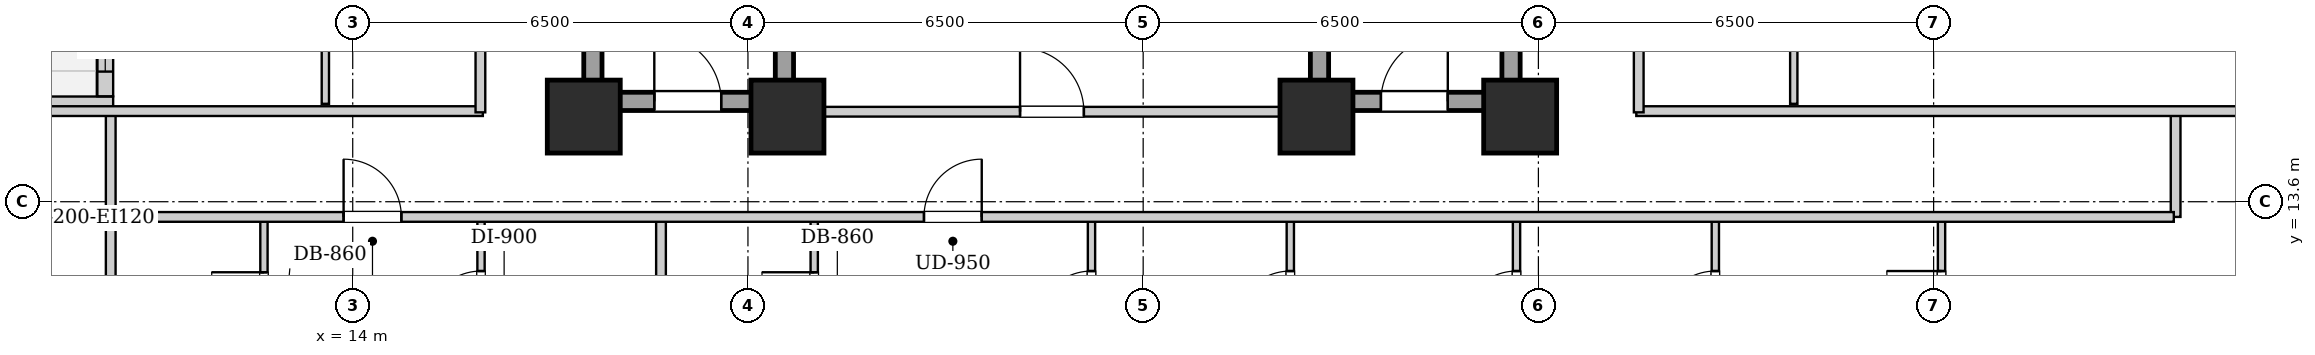
"""IFC4 building model, lengths in metres.
Left out: names, types, materials, properties, quantities, classifications, styles, units other than length and angle.
Written with IfcOpenShell. Run it as: python <this file> out.ifc"""

import sys

from ifc_helpers import new_model, si_unit, direction, frame, frame_2d, origin, origin_2d, place, context, subcontext, project, spatial, rectangle, extrude, element, fill, save


model = new_model("IFC4")
c1 = context("Model", 3, precision=1e-05, world=origin(), true_north=direction((0.0, 1.0)))
c2 = subcontext(c1, "Body", "Model", "MODEL_VIEW")
j1 = project(units=[si_unit("LENGTHUNIT", "METRE"), si_unit("PLANEANGLEUNIT", "RADIAN")], contexts=[c1])
p1 = place(None, origin())
s1 = spatial("IfcSite", under=j1, at=p1, CompositionType="ELEMENT")
p2 = place(p1, origin())
s2 = spatial("IfcBuilding", under=s1, at=p2, CompositionType="ELEMENT")
p3 = place(p2, frame((0.0, 0.0, 38.6)))
s3 = spatial("IfcBuildingStorey", under=s2, at=p3, CompositionType="ELEMENT", Elevation=38.6)
for number, where, z_axis, x_axis in (
    (1, (17.8, 15.0, 0.0), (0.0, 0.0, 1.0), (1.0, 0.0, 0.0)),
    (2, (21.15, 15.0, 0.0), (0.0, 0.0, 1.0), (1.0, 0.0, 0.0)),
    (3, (29.85, 15.0, 0.0), (0.0, 0.0, 1.0), (1.0, 0.0, 0.0)),
    (4, (33.2, 15.0, 0.0), (0.0, 0.0, 1.0), (1.0, 0.0, 0.0)),
):
    element("IfcColumn", number, at=place(p3, frame(where, z_axis=z_axis, x_axis=x_axis)), inside=s3, PredefinedType="COLUMN", context=c2, shape_type="SweptSolid", body=[
        extrude(rectangle(XDim=1.2, YDim=1.2, at=origin_2d()), origin(), (0.0, 0.0, 1.0), 3.2),
    ])
p4 = place(p3, frame((7.66, 15.2, 0.0), z_axis=(0.0, 0.0, 1.0), x_axis=(1.0, 0.0, 0.0)))
e5 = element("IfcWall", 5, at=p4, inside=s3, PredefinedType="SOLIDWALL", context=c2, shape_type="SweptSolid", body=[
    extrude(rectangle(XDim=2.4, YDim=0.26, at=frame_2d((1.2, 0.0))), origin(), (0.0, 0.0, 1.0), 2.94),
])
p5 = place(p3, frame((9.93, 15.334, 0.0), z_axis=(0.0, 0.0, 1.0), x_axis=(0.0, 1.0, 0.0)))
e6 = element("IfcWall", 6, at=p5, inside=s3, PredefinedType="SOLIDWALL", context=c2, shape_type="SweptSolid", body=[
    extrude(rectangle(XDim=3.932, YDim=0.26, at=frame_2d((1.966, 0.0))), origin(), (0.0, 0.0, 1.0), 2.94),
])
p6 = place(p5, frame((1.416, 0.0, 0.0)))
e7 = element("IfcOpeningElement", 7, at=p6, cuts=e6, PredefinedType="OPENING", context=c2, shape_type="SweptSolid", body=[
    extrude(rectangle(XDim=1.1, YDim=2.0, at=frame_2d((0.55, 1.0))), frame((0.0, 0.14, 0.0), z_axis=(0.0, -1.0, 0.0), x_axis=(1.0, 0.0, 0.0)), (0.0, 0.0, 1.0), 0.28),
])
p7 = place(p5, frame((0.406, 0.0, 0.55)))
e8 = element("IfcOpeningElement", 8, at=p7, cuts=e6, PredefinedType="OPENING", context=c2, shape_type="SweptSolid", body=[
    extrude(rectangle(XDim=0.85, YDim=1.2, at=frame_2d((0.425, 0.6))), frame((0.0, 0.14, 0.0), z_axis=(0.0, -1.0, 0.0), x_axis=(1.0, 0.0, 0.0)), (0.0, 0.0, 1.0), 0.28),
])
for number, where, z_axis, x_axis in (
    (9, (17.95, 15.1, 0.0), (0.0, 0.0, 1.0), (0.0, 1.0, 0.0)),
    (10, (21.1, 15.1, 0.0), (0.0, 0.0, 1.0), (0.0, 1.0, 0.0)),
):
    element("IfcWall", number, at=place(p3, frame(where, z_axis=z_axis, x_axis=x_axis)), inside=s3, PredefinedType="SHEAR", context=c2, shape_type="SweptSolid", body=[
        extrude(rectangle(XDim=9.0, YDim=0.3, at=frame_2d((4.5, 0.0))), origin(), (0.0, 0.0, 1.0), 2.94),
    ])
p8 = place(p3, frame((18.1, 15.25, 0.0), z_axis=(0.0, 0.0, 1.0), x_axis=(1.0, 0.0, 0.0)))
e11 = element("IfcWall", 11, at=p8, inside=s3, PredefinedType="SHEAR", context=c2, shape_type="SweptSolid", body=[
    extrude(rectangle(XDim=2.85, YDim=0.3, at=frame_2d((1.425, 0.0))), origin(), (0.0, 0.0, 1.0), 2.94),
])
p9 = place(p8, frame((0.86, 0.0, 0.0)))
e12 = element("IfcOpeningElement", 12, at=p9, cuts=e11, PredefinedType="OPENING", context=c2, shape_type="SweptSolid", body=[
    extrude(rectangle(XDim=1.1, YDim=2.05, at=frame_2d((0.55, 1.025))), frame((0.0, 0.16, 0.0), z_axis=(0.0, -1.0, 0.0), x_axis=(1.0, 0.0, 0.0)), (0.0, 0.0, 1.0), 0.32),
])
for number, where, z_axis, x_axis in (
    (13, (29.9, 15.1, 0.0), (0.0, 0.0, 1.0), (0.0, 1.0, 0.0)),
    (14, (33.05, 15.1, 0.0), (0.0, 0.0, 1.0), (0.0, 1.0, 0.0)),
):
    element("IfcWall", number, at=place(p3, frame(where, z_axis=z_axis, x_axis=x_axis)), inside=s3, PredefinedType="SHEAR", context=c2, shape_type="SweptSolid", body=[
        extrude(rectangle(XDim=9.0, YDim=0.3, at=frame_2d((4.5, 0.0))), origin(), (0.0, 0.0, 1.0), 2.94),
    ])
p10 = place(p3, frame((30.05, 15.25, 0.0), z_axis=(0.0, 0.0, 1.0), x_axis=(1.0, 0.0, 0.0)))
e15 = element("IfcWall", 15, at=p10, inside=s3, PredefinedType="SHEAR", context=c2, shape_type="SweptSolid", body=[
    extrude(rectangle(XDim=2.85, YDim=0.3, at=frame_2d((1.425, 0.0))), origin(), (0.0, 0.0, 1.0), 2.94),
])
p11 = place(p10, frame((0.86, 0.0, 0.0)))
e16 = element("IfcOpeningElement", 16, at=p11, cuts=e15, PredefinedType="OPENING", context=c2, shape_type="SweptSolid", body=[
    extrude(rectangle(XDim=1.1, YDim=2.05, at=frame_2d((0.55, 1.025))), frame((0.0, 0.16, 0.0), z_axis=(0.0, -1.0, 0.0), x_axis=(1.0, 0.0, 0.0)), (0.0, 0.0, 1.0), 0.32),
])
p12 = place(p3, frame((21.25, 15.08, 0.0), z_axis=(0.0, 0.0, 1.0), x_axis=(1.0, 0.0, 0.0)))
e17 = element("IfcWall", 17, at=p12, inside=s3, PredefinedType="PARTITIONING", context=c2, shape_type="SweptSolid", body=[
    extrude(rectangle(XDim=8.5, YDim=0.16, at=frame_2d((4.25, 0.0))), origin(), (0.0, 0.0, 1.0), 2.155),
])
p13 = place(p12, frame((3.725, 0.0, 0.0)))
e18 = element("IfcOpeningElement", 18, at=p13, cuts=e17, PredefinedType="OPENING", context=c2, shape_type="SweptSolid", body=[
    extrude(rectangle(XDim=1.05, YDim=2.05, at=frame_2d((0.525, 1.025))), frame((0.0, 0.09, 0.0), z_axis=(0.0, -1.0, 0.0), x_axis=(1.0, 0.0, 0.0)), (0.0, 0.0, 1.0), 0.18),
])
for number, where, z_axis, x_axis in (
    (19, (10.02, 13.35, 0.0), (0.0, 0.0, 1.0), (0.0, 1.0, 0.0)),
    (20, (43.98, 13.35, 0.0), (0.0, 0.0, 1.0), (0.0, 1.0, 0.0)),
):
    element("IfcWall", number, at=place(p3, frame(where, z_axis=z_axis, x_axis=x_axis)), inside=s3, PredefinedType="PARTITIONING", context=c2, shape_type="SweptSolid", body=[
        extrude(rectangle(XDim=1.74, YDim=0.16, at=frame_2d((0.87, 0.0))), origin(), (0.0, 0.0, 1.0), 2.94),
    ])
p14 = place(p3, frame((7.78, 15.09, 0.0), z_axis=(0.0, 0.0, 1.0), x_axis=(1.0, 0.0, 0.0)))
e21 = element("IfcWall", 21, at=p14, inside=s3, PredefinedType="PARTITIONING", context=c2, shape_type="SweptSolid", body=[
    extrude(rectangle(XDim=8.36, YDim=0.16, at=frame_2d((4.18, 0.0))), origin(), (0.0, 0.0, 1.0), 2.155),
])
p15 = place(p3, frame((35.11, 15.09, 0.0), z_axis=(0.0, 0.0, 1.0), x_axis=(1.0, 0.0, 0.0)))
e22 = element("IfcWall", 22, at=p15, inside=s3, PredefinedType="PARTITIONING", context=c2, shape_type="SweptSolid", body=[
    extrude(rectangle(XDim=11.11, YDim=0.16, at=frame_2d((5.555, 0.0))), origin(), (0.0, 0.0, 1.0), 2.155),
])
p16 = place(p3, frame((10.02, 10.65, 0.0), z_axis=(0.0, 0.0, 1.0), x_axis=(0.0, 1.0, 0.0)))
e23 = element("IfcWall", 23, at=p16, inside=s3, PredefinedType="PARTITIONING", context=c2, shape_type="SweptSolid", body=[
    extrude(rectangle(XDim=2.66, YDim=0.16, at=frame_2d((1.33, 0.0))), origin(), (0.0, 0.0, 1.0), 2.94),
])
p17 = place(p3, frame((12.54, 10.71, 0.0), z_axis=(0.0, 0.0, 1.0), x_axis=(0.0, 1.0, 0.0)))
e24 = element("IfcWall", 24, at=p17, inside=s3, PredefinedType="PARTITIONING", context=c2, shape_type="SweptSolid", body=[
    extrude(rectangle(XDim=2.6, YDim=0.12, at=frame_2d((1.3, 0.0))), origin(), (0.0, 0.0, 1.0), 2.94),
])
p18 = place(p17, frame((0.87, 0.0, 0.0)))
e25 = element("IfcOpeningElement", 25, at=p18, cuts=e24, PredefinedType="OPENING", context=c2, shape_type="SweptSolid", body=[
    extrude(rectangle(XDim=0.86, YDim=2.05, at=frame_2d((0.43, 1.025))), frame((0.0, 0.07, 0.0), z_axis=(0.0, -1.0, 0.0), x_axis=(1.0, 0.0, 0.0)), (0.0, 0.0, 1.0), 0.14),
])
p19 = place(p3, frame((16.11, 10.71, 0.0), z_axis=(0.0, 0.0, 1.0), x_axis=(0.0, 1.0, 0.0)))
e26 = element("IfcWall", 26, at=p19, inside=s3, PredefinedType="PARTITIONING", context=c2, shape_type="SweptSolid", body=[
    extrude(rectangle(XDim=2.6, YDim=0.12, at=frame_2d((1.3, 0.0))), origin(), (0.0, 0.0, 1.0), 2.94),
])
p20 = place(p19, frame((0.85, 0.0, 0.0)))
e27 = element("IfcOpeningElement", 27, at=p20, cuts=e26, PredefinedType="OPENING", context=c2, shape_type="SweptSolid", body=[
    extrude(rectangle(XDim=0.9, YDim=2.05, at=frame_2d((0.45, 1.025))), frame((0.0, 0.07, 0.0), z_axis=(0.0, -1.0, 0.0), x_axis=(1.0, 0.0, 0.0)), (0.0, 0.0, 1.0), 0.14),
])
p21 = place(p3, frame((19.07, 0.28, 0.0), z_axis=(0.0, 0.0, 1.0), x_axis=(0.0, 1.0, 0.0)))
e28 = element("IfcWall", 28, at=p21, inside=s3, PredefinedType="PARTITIONING", context=c2, shape_type="SweptSolid", body=[
    extrude(rectangle(XDim=13.03, YDim=0.16, at=frame_2d((6.515, 0.0))), origin(), (0.0, 0.0, 1.0), 2.94),
])
p22 = place(p3, frame((21.59, 10.71, 0.0), z_axis=(0.0, 0.0, 1.0), x_axis=(0.0, 1.0, 0.0)))
e29 = element("IfcWall", 29, at=p22, inside=s3, PredefinedType="PARTITIONING", context=c2, shape_type="SweptSolid", body=[
    extrude(rectangle(XDim=2.6, YDim=0.12, at=frame_2d((1.3, 0.0))), origin(), (0.0, 0.0, 1.0), 2.94),
])
p23 = place(p22, frame((0.87, 0.0, 0.0)))
e30 = element("IfcOpeningElement", 30, at=p23, cuts=e29, PredefinedType="OPENING", context=c2, shape_type="SweptSolid", body=[
    extrude(rectangle(XDim=0.86, YDim=2.05, at=frame_2d((0.43, 1.025))), frame((0.0, 0.07, 0.0), z_axis=(0.0, -1.0, 0.0), x_axis=(1.0, 0.0, 0.0)), (0.0, 0.0, 1.0), 0.14),
])
p24 = place(p3, frame((26.15, 10.71, 0.0), z_axis=(0.0, 0.0, 1.0), x_axis=(0.0, 1.0, 0.0)))
e31 = element("IfcWall", 31, at=p24, inside=s3, PredefinedType="PARTITIONING", context=c2, shape_type="SweptSolid", body=[
    extrude(rectangle(XDim=2.6, YDim=0.12, at=frame_2d((1.3, 0.0))), origin(), (0.0, 0.0, 1.0), 2.94),
])
p25 = place(p24, frame((0.85, 0.0, 0.0)))
e32 = element("IfcOpeningElement", 32, at=p25, cuts=e31, PredefinedType="OPENING", context=c2, shape_type="SweptSolid", body=[
    extrude(rectangle(XDim=0.9, YDim=2.05, at=frame_2d((0.45, 1.025))), frame((0.0, 0.07, 0.0), z_axis=(0.0, -1.0, 0.0), x_axis=(1.0, 0.0, 0.0)), (0.0, 0.0, 1.0), 0.14),
])
p26 = place(p3, frame((29.42, 10.71, 0.0), z_axis=(0.0, 0.0, 1.0), x_axis=(0.0, 1.0, 0.0)))
e33 = element("IfcWall", 33, at=p26, inside=s3, PredefinedType="PARTITIONING", context=c2, shape_type="SweptSolid", body=[
    extrude(rectangle(XDim=2.6, YDim=0.12, at=frame_2d((1.3, 0.0))), origin(), (0.0, 0.0, 1.0), 2.94),
])
p27 = place(p26, frame((0.85, 0.0, 0.0)))
e34 = element("IfcOpeningElement", 34, at=p27, cuts=e33, PredefinedType="OPENING", context=c2, shape_type="SweptSolid", body=[
    extrude(rectangle(XDim=0.9, YDim=2.05, at=frame_2d((0.45, 1.025))), frame((0.0, 0.07, 0.0), z_axis=(0.0, -1.0, 0.0), x_axis=(1.0, 0.0, 0.0)), (0.0, 0.0, 1.0), 0.14),
])
p28 = place(p3, frame((33.14, 10.71, 0.0), z_axis=(0.0, 0.0, 1.0), x_axis=(0.0, 1.0, 0.0)))
e35 = element("IfcWall", 35, at=p28, inside=s3, PredefinedType="PARTITIONING", context=c2, shape_type="SweptSolid", body=[
    extrude(rectangle(XDim=2.6, YDim=0.12, at=frame_2d((1.3, 0.0))), origin(), (0.0, 0.0, 1.0), 2.155),
])
p29 = place(p28, frame((0.85, 0.0, 0.0)))
e36 = element("IfcOpeningElement", 36, at=p29, cuts=e35, PredefinedType="OPENING", context=c2, shape_type="SweptSolid", body=[
    extrude(rectangle(XDim=0.9, YDim=2.05, at=frame_2d((0.45, 1.025))), frame((0.0, 0.07, 0.0), z_axis=(0.0, -1.0, 0.0), x_axis=(1.0, 0.0, 0.0)), (0.0, 0.0, 1.0), 0.14),
])
p30 = place(p3, frame((36.41, 10.71, 0.0), z_axis=(0.0, 0.0, 1.0), x_axis=(0.0, 1.0, 0.0)))
e37 = element("IfcWall", 37, at=p30, inside=s3, PredefinedType="PARTITIONING", context=c2, shape_type="SweptSolid", body=[
    extrude(rectangle(XDim=2.6, YDim=0.12, at=frame_2d((1.3, 0.0))), origin(), (0.0, 0.0, 1.0), 2.94),
])
p31 = place(p30, frame((0.85, 0.0, 0.0)))
e38 = element("IfcOpeningElement", 38, at=p31, cuts=e37, PredefinedType="OPENING", context=c2, shape_type="SweptSolid", body=[
    extrude(rectangle(XDim=0.9, YDim=2.05, at=frame_2d((0.45, 1.025))), frame((0.0, 0.07, 0.0), z_axis=(0.0, -1.0, 0.0), x_axis=(1.0, 0.0, 0.0)), (0.0, 0.0, 1.0), 0.14),
])
p32 = place(p3, frame((40.13, 10.71, 0.0), z_axis=(0.0, 0.0, 1.0), x_axis=(0.0, 1.0, 0.0)))
e39 = element("IfcWall", 39, at=p32, inside=s3, PredefinedType="PARTITIONING", context=c2, shape_type="SweptSolid", body=[
    extrude(rectangle(XDim=2.6, YDim=0.12, at=frame_2d((1.3, 0.0))), origin(), (0.0, 0.0, 1.0), 2.94),
])
p33 = place(p32, frame((0.85, 0.0, 0.0)))
e40 = element("IfcOpeningElement", 40, at=p33, cuts=e39, PredefinedType="OPENING", context=c2, shape_type="SweptSolid", body=[
    extrude(rectangle(XDim=0.9, YDim=2.05, at=frame_2d((0.45, 1.025))), frame((0.0, 0.07, 0.0), z_axis=(0.0, -1.0, 0.0), x_axis=(1.0, 0.0, 0.0)), (0.0, 0.0, 1.0), 0.14),
])
p34 = place(p3, frame((13.55, 15.21, 0.0), z_axis=(0.0, 0.0, 1.0), x_axis=(0.0, 1.0, 0.0)))
e41 = element("IfcWall", 41, at=p34, inside=s3, PredefinedType="PARTITIONING", context=c2, shape_type="SweptSolid", body=[
    extrude(rectangle(XDim=1.85, YDim=0.12, at=frame_2d((0.925, 0.0))), origin(), (0.0, 0.0, 1.0), 2.94),
])
p35 = place(p3, frame((37.7, 15.21, 0.0), z_axis=(0.0, 0.0, 1.0), x_axis=(0.0, 1.0, 0.0)))
e42 = element("IfcWall", 42, at=p35, inside=s3, PredefinedType="PARTITIONING", context=c2, shape_type="SweptSolid", body=[
    extrude(rectangle(XDim=2.3, YDim=0.12, at=frame_2d((1.15, 0.0))), origin(), (0.0, 0.0, 1.0), 2.94),
])
p36 = place(p3, frame((10.05, 13.35, 0.0), z_axis=(0.0, 0.0, 1.0), x_axis=(1.0, 0.0, 0.0)))
e43 = element("IfcWall", 43, at=p36, inside=s3, PredefinedType="PARTITIONING", context=c2, shape_type="SweptSolid", body=[
    extrude(rectangle(XDim=33.9, YDim=0.16, at=frame_2d((16.95, 0.0))), origin(), (0.0, 0.0, 1.0), 2.94),
])
p37 = place(p36, frame((3.8, 0.0, 0.0)))
e44 = element("IfcOpeningElement", 44, at=p37, cuts=e43, PredefinedType="OPENING", context=c2, shape_type="SweptSolid", body=[
    extrude(rectangle(XDim=0.95, YDim=2.1, at=frame_2d((0.475, 1.05))), frame((0.0, 0.09, 0.0), z_axis=(0.0, -1.0, 0.0), x_axis=(1.0, 0.0, 0.0)), (0.0, 0.0, 1.0), 0.18),
])
p38 = place(p36, frame((13.345, 0.0, 0.0)))
e45 = element("IfcOpeningElement", 45, at=p38, cuts=e43, PredefinedType="OPENING", context=c2, shape_type="SweptSolid", body=[
    extrude(rectangle(XDim=0.95, YDim=2.1, at=frame_2d((0.475, 1.05))), frame((0.0, 0.09, 0.0), z_axis=(0.0, -1.0, 0.0), x_axis=(1.0, 0.0, 0.0)), (0.0, 0.0, 1.0), 0.18),
])
p39 = place(p3, frame((16.1, 15.07, 0.0), z_axis=(0.0, 0.0, 1.0), x_axis=(0.0, 1.0, 0.0)))
e46 = element("IfcWall", 46, at=p39, inside=s3, PredefinedType="PARTITIONING", context=c2, shape_type="SweptSolid", body=[
    extrude(rectangle(XDim=13.93, YDim=0.16, at=frame_2d((6.965, 0.0))), origin(), (0.0, 0.0, 1.0), 2.94),
])
p40 = place(p39, frame((3.608, 0.0, 0.0)))
e47 = element("IfcOpeningElement", 47, at=p40, cuts=e46, PredefinedType="OPENING", context=c2, shape_type="SweptSolid", body=[
    extrude(rectangle(XDim=0.95, YDim=2.1, at=frame_2d((0.475, 1.05))), frame((0.0, 0.09, 0.0), z_axis=(0.0, -1.0, 0.0), x_axis=(1.0, 0.0, 0.0)), (0.0, 0.0, 1.0), 0.18),
])
p41 = place(p39, frame((10.649, 0.0, 0.0)))
e48 = element("IfcOpeningElement", 48, at=p41, cuts=e46, PredefinedType="OPENING", context=c2, shape_type="SweptSolid", body=[
    extrude(rectangle(XDim=0.95, YDim=2.1, at=frame_2d((0.475, 1.05))), frame((0.0, 0.09, 0.0), z_axis=(0.0, -1.0, 0.0), x_axis=(1.0, 0.0, 0.0)), (0.0, 0.0, 1.0), 0.18),
])
p42 = place(p3, frame((35.15, 15.07, 0.0), z_axis=(0.0, 0.0, 1.0), x_axis=(0.0, 1.0, 0.0)))
e49 = element("IfcWall", 49, at=p42, inside=s3, PredefinedType="PARTITIONING", context=c2, shape_type="SweptSolid", body=[
    extrude(rectangle(XDim=13.93, YDim=0.16, at=frame_2d((6.965, 0.0))), origin(), (0.0, 0.0, 1.0), 2.94),
])
p43 = place(p42, frame((4.385, 0.0, 0.0)))
e50 = element("IfcOpeningElement", 50, at=p43, cuts=e49, PredefinedType="OPENING", context=c2, shape_type="SweptSolid", body=[
    extrude(rectangle(XDim=0.95, YDim=2.1, at=frame_2d((0.475, 1.05))), frame((0.0, 0.09, 0.0), z_axis=(0.0, -1.0, 0.0), x_axis=(1.0, 0.0, 0.0)), (0.0, 0.0, 1.0), 0.18),
])
p44 = place(p9, origin())
e51 = element("IfcDoor", 51, at=p44, inside=s3, OperationType="SINGLE_SWING_LEFT", PredefinedType="DOOR", context=c2, shape_type="SweptSolid", body=[
    extrude(rectangle(XDim=1.1, YDim=2.05, at=frame_2d((0.55, 1.025))), frame((0.0, 0.025, 0.0), z_axis=(0.0, -1.0, 0.0), x_axis=(1.0, 0.0, 0.0)), (0.0, 0.0, 1.0), 0.05),
])
fill(e12, e51)
p45 = place(p11, origin())
e52 = element("IfcDoor", 52, at=p45, inside=s3, OperationType="SINGLE_SWING_RIGHT", PredefinedType="DOOR", context=c2, shape_type="SweptSolid", body=[
    extrude(rectangle(XDim=1.1, YDim=2.05, at=frame_2d((0.55, 1.025))), frame((0.0, 0.025, 0.0), z_axis=(0.0, -1.0, 0.0), x_axis=(1.0, 0.0, 0.0)), (0.0, 0.0, 1.0), 0.05),
])
fill(e16, e52)
p46 = place(p13, origin())
e53 = element("IfcDoor", 53, at=p46, inside=s3, OperationType="SINGLE_SWING_LEFT", PredefinedType="DOOR", context=c2, shape_type="SweptSolid", body=[
    extrude(rectangle(XDim=1.05, YDim=2.05, at=frame_2d((0.525, 1.025))), frame((0.0, 0.025, 0.0), z_axis=(0.0, -1.0, 0.0), x_axis=(1.0, 0.0, 0.0)), (0.0, 0.0, 1.0), 0.05),
])
fill(e18, e53)
p47 = place(p18, origin())
e54 = element("IfcDoor", 54, at=p47, inside=s3, OperationType="SINGLE_SWING_RIGHT", PredefinedType="DOOR", context=c2, shape_type="SweptSolid", body=[
    extrude(rectangle(XDim=0.86, YDim=2.05, at=frame_2d((0.43, 1.025))), frame((0.0, 0.025, 0.0), z_axis=(0.0, -1.0, 0.0), x_axis=(1.0, 0.0, 0.0)), (0.0, 0.0, 1.0), 0.05),
])
fill(e25, e54)
p48 = place(p20, origin())
e55 = element("IfcDoor", 55, at=p48, inside=s3, OperationType="SINGLE_SWING_LEFT", PredefinedType="DOOR", context=c2, shape_type="SweptSolid", body=[
    extrude(rectangle(XDim=0.9, YDim=2.05, at=frame_2d((0.45, 1.025))), frame((0.0, 0.025, 0.0), z_axis=(0.0, -1.0, 0.0), x_axis=(1.0, 0.0, 0.0)), (0.0, 0.0, 1.0), 0.05),
])
fill(e27, e55)
p49 = place(p23, origin())
e56 = element("IfcDoor", 56, at=p49, inside=s3, OperationType="SINGLE_SWING_RIGHT", PredefinedType="DOOR", context=c2, shape_type="SweptSolid", body=[
    extrude(rectangle(XDim=0.86, YDim=2.05, at=frame_2d((0.43, 1.025))), frame((0.0, 0.025, 0.0), z_axis=(0.0, -1.0, 0.0), x_axis=(1.0, 0.0, 0.0)), (0.0, 0.0, 1.0), 0.05),
])
fill(e30, e56)
p50 = place(p25, origin())
e57 = element("IfcDoor", 57, at=p50, inside=s3, OperationType="SINGLE_SWING_LEFT", PredefinedType="DOOR", context=c2, shape_type="SweptSolid", body=[
    extrude(rectangle(XDim=0.9, YDim=2.05, at=frame_2d((0.45, 1.025))), frame((0.0, 0.025, 0.0), z_axis=(0.0, -1.0, 0.0), x_axis=(1.0, 0.0, 0.0)), (0.0, 0.0, 1.0), 0.05),
])
fill(e32, e57)
p51 = place(p27, origin())
e58 = element("IfcDoor", 58, at=p51, inside=s3, OperationType="SINGLE_SWING_LEFT", PredefinedType="DOOR", context=c2, shape_type="SweptSolid", body=[
    extrude(rectangle(XDim=0.9, YDim=2.05, at=frame_2d((0.45, 1.025))), frame((0.0, 0.025, 0.0), z_axis=(0.0, -1.0, 0.0), x_axis=(1.0, 0.0, 0.0)), (0.0, 0.0, 1.0), 0.05),
])
fill(e34, e58)
p52 = place(p29, origin())
e59 = element("IfcDoor", 59, at=p52, inside=s3, OperationType="SINGLE_SWING_LEFT", PredefinedType="DOOR", context=c2, shape_type="SweptSolid", body=[
    extrude(rectangle(XDim=0.9, YDim=2.05, at=frame_2d((0.45, 1.025))), frame((0.0, 0.025, 0.0), z_axis=(0.0, -1.0, 0.0), x_axis=(1.0, 0.0, 0.0)), (0.0, 0.0, 1.0), 0.05),
])
fill(e36, e59)
p53 = place(p31, origin())
e60 = element("IfcDoor", 60, at=p53, inside=s3, OperationType="SINGLE_SWING_LEFT", PredefinedType="DOOR", context=c2, shape_type="SweptSolid", body=[
    extrude(rectangle(XDim=0.9, YDim=2.05, at=frame_2d((0.45, 1.025))), frame((0.0, 0.025, 0.0), z_axis=(0.0, -1.0, 0.0), x_axis=(1.0, 0.0, 0.0)), (0.0, 0.0, 1.0), 0.05),
])
fill(e38, e60)
p54 = place(p33, origin())
e61 = element("IfcDoor", 61, at=p54, inside=s3, OperationType="SINGLE_SWING_RIGHT", PredefinedType="DOOR", context=c2, shape_type="SweptSolid", body=[
    extrude(rectangle(XDim=0.9, YDim=2.05, at=frame_2d((0.45, 1.025))), frame((0.0, 0.025, 0.0), z_axis=(0.0, -1.0, 0.0), x_axis=(1.0, 0.0, 0.0)), (0.0, 0.0, 1.0), 0.05),
])
fill(e40, e61)
p55 = place(p37, origin())
e62 = element("IfcDoor", 62, at=p55, inside=s3, OperationType="SINGLE_SWING_LEFT", PredefinedType="DOOR", context=c2, shape_type="SweptSolid", body=[
    extrude(rectangle(XDim=0.95, YDim=2.1, at=frame_2d((0.475, 1.05))), frame((0.0, 0.025, 0.0), z_axis=(0.0, -1.0, 0.0), x_axis=(1.0, 0.0, 0.0)), (0.0, 0.0, 1.0), 0.05),
])
fill(e44, e62)
p56 = place(p38, origin())
e63 = element("IfcDoor", 63, at=p56, inside=s3, OperationType="SINGLE_SWING_RIGHT", PredefinedType="DOOR", context=c2, shape_type="SweptSolid", body=[
    extrude(rectangle(XDim=0.95, YDim=2.1, at=frame_2d((0.475, 1.05))), frame((0.0, 0.025, 0.0), z_axis=(0.0, -1.0, 0.0), x_axis=(1.0, 0.0, 0.0)), (0.0, 0.0, 1.0), 0.05),
])
fill(e45, e63)
p57 = place(p7, origin())
e64 = element("IfcWindow", 64, at=p57, inside=s3, PartitioningType="SINGLE_PANEL", PredefinedType="WINDOW", context=c2, shape_type="SweptSolid", body=[
    extrude(rectangle(XDim=0.85, YDim=1.2, at=frame_2d((0.425, 0.6))), frame((0.0, 0.03, 0.0), z_axis=(0.0, -1.0, 0.0), x_axis=(1.0, 0.0, 0.0)), (0.0, 0.0, 1.0), 0.06),
])
fill(e8, e64)
save(model, sys.argv[1])
